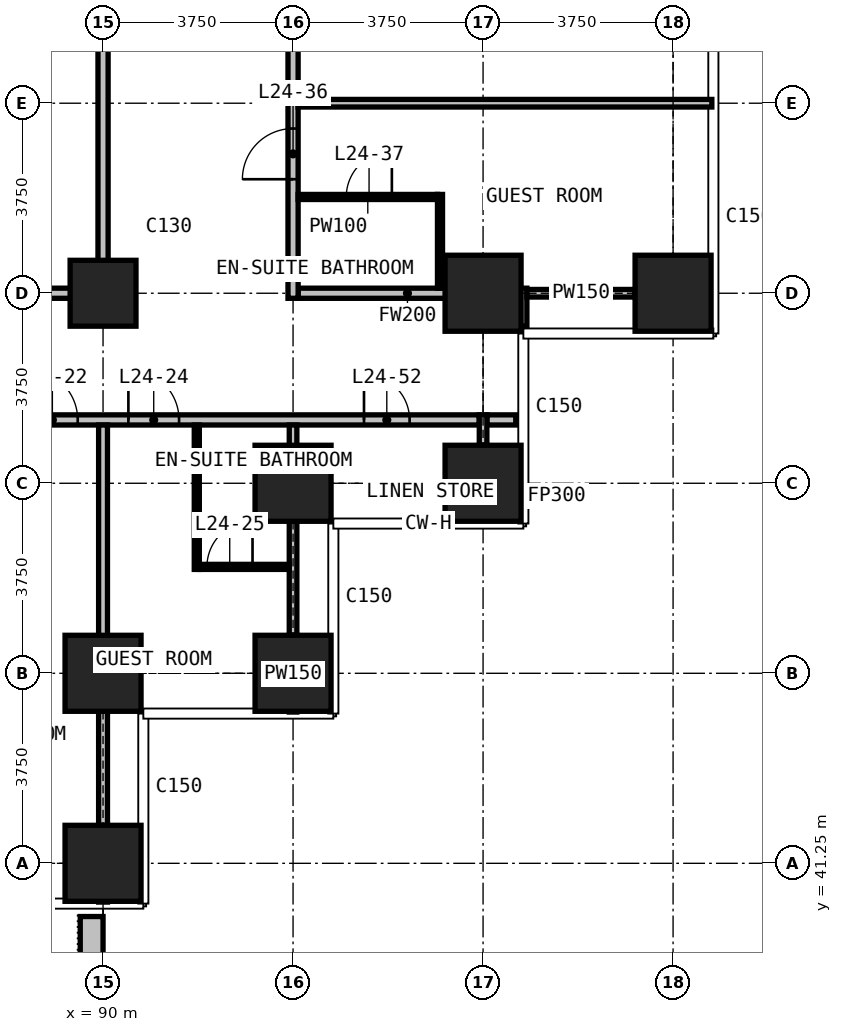
"""IFC4 building model, lengths in metres.
Left out: names, types, materials, properties, quantities, classifications, styles, units other than length and angle.
Written with IfcOpenShell. Run it as: python <this file> out.ifc"""

import sys

from ifc_helpers import new_model, si_unit, direction, frame, frame_2d, origin, origin_2d, place, context, subcontext, project, spatial, rectangle, extrude, element, fill, save


model = new_model("IFC4")
c1 = context("Model", 3, precision=1e-05, world=origin(), true_north=direction((0.0, 1.0)))
c2 = subcontext(c1, "Body", "Model", "MODEL_VIEW")
j1 = project(units=[si_unit("LENGTHUNIT", "METRE"), si_unit("PLANEANGLEUNIT", "RADIAN")], contexts=[c1])
p1 = place(None, origin())
s1 = spatial("IfcSite", under=j1, at=p1, CompositionType="ELEMENT")
p2 = place(p1, origin())
s2 = spatial("IfcBuilding", under=s1, at=p2, CompositionType="ELEMENT")
p3 = place(p2, frame((0.0, 0.0, 98.9)))
s3 = spatial("IfcBuildingStorey", under=s2, at=p3, CompositionType="ELEMENT", Elevation=98.9)
for number, where, z_axis, x_axis in (
    (1, (90.0, 41.25, 0.0), (0.0, 0.0, 1.0), (1.0, 0.0, 0.0)),
    (2, (90.0, 45.0, 0.0), (0.0, 0.0, 1.0), (1.0, 0.0, 0.0)),
):
    element("IfcColumn", number, at=place(p3, frame(where, z_axis=z_axis, x_axis=x_axis)), inside=s3, PredefinedType="COLUMN", context=c2, shape_type="SweptSolid", body=[
        extrude(rectangle(XDim=1.5, YDim=1.5, at=origin_2d()), origin(), (0.0, 0.0, 1.0), 3.3),
    ])
p4 = place(p3, frame((90.0, 52.5, 0.0), z_axis=(0.0, 0.0, 1.0), x_axis=(1.0, 0.0, 0.0)))
e3 = element("IfcColumn", 3, at=p4, inside=s3, PredefinedType="COLUMN", context=c2, shape_type="SweptSolid", body=[
    extrude(rectangle(XDim=1.3, YDim=1.3, at=origin_2d()), origin(), (0.0, 0.0, 1.0), 3.3),
])
for number, where, z_axis, x_axis in (
    (4, (93.75, 45.0, 0.0), (0.0, 0.0, 1.0), (1.0, 0.0, 0.0)),
    (5, (93.75, 48.75, 0.0), (0.0, 0.0, 1.0), (1.0, 0.0, 0.0)),
    (6, (97.5, 48.75, 0.0), (0.0, 0.0, 1.0), (1.0, 0.0, 0.0)),
    (7, (97.5, 52.5, 0.0), (0.0, 0.0, 1.0), (1.0, 0.0, 0.0)),
    (8, (101.25, 52.5, 0.0), (0.0, 0.0, 1.0), (1.0, 0.0, 0.0)),
):
    element("IfcColumn", number, at=place(p3, frame(where, z_axis=z_axis, x_axis=x_axis)), inside=s3, PredefinedType="COLUMN", context=c2, shape_type="SweptSolid", body=[
        extrude(rectangle(XDim=1.5, YDim=1.5, at=origin_2d()), origin(), (0.0, 0.0, 1.0), 3.3),
    ])
p5 = place(p3, frame((89.775, 40.2, 0.0), z_axis=(0.0, 0.0, 1.0), x_axis=(0.0, -1.0, 0.0)))
e9 = element("IfcWall", 9, at=p5, inside=s3, PredefinedType="USERDEFINED", context=c2, shape_type="SweptSolid", body=[
    extrude(rectangle(XDim=2.35, YDim=0.45, at=frame_2d((1.175, 0.0))), origin(), (0.0, 0.0, 1.0), 1.1),
])
p6 = place(p3, frame((52.575, 50.0, 0.0), z_axis=(0.0, 0.0, 1.0), x_axis=(1.0, 0.0, 0.0)))
e10 = element("IfcWall", 10, at=p6, inside=s3, PredefinedType="PARTITIONING", context=c2, shape_type="SweptSolid", body=[
    extrude(rectangle(XDim=44.85, YDim=0.2, at=frame_2d((22.425, 0.0))), origin(), (0.0, 0.0, 1.0), 2.95),
])
p7 = place(p6, frame((5.925, 0.0, 0.0)))
e11 = element("IfcOpeningElement", 11, at=p7, cuts=e10, PredefinedType="OPENING", context=c2, shape_type="SweptSolid", body=[
    extrude(rectangle(XDim=1.0, YDim=2.2, at=frame_2d((0.5, 1.1))), frame((0.0, 0.11, 0.0), z_axis=(0.0, -1.0, 0.0), x_axis=(1.0, 0.0, 0.0)), (0.0, 0.0, 1.0), 0.22),
])
p8 = place(p6, frame((7.925, 0.0, 0.0)))
e12 = element("IfcOpeningElement", 12, at=p8, cuts=e10, PredefinedType="OPENING", context=c2, shape_type="SweptSolid", body=[
    extrude(rectangle(XDim=1.0, YDim=2.2, at=frame_2d((0.5, 1.1))), frame((0.0, 0.11, 0.0), z_axis=(0.0, -1.0, 0.0), x_axis=(1.0, 0.0, 0.0)), (0.0, 0.0, 1.0), 0.22),
])
p9 = place(p6, frame((13.425, 0.0, 0.0)))
e13 = element("IfcOpeningElement", 13, at=p9, cuts=e10, PredefinedType="OPENING", context=c2, shape_type="SweptSolid", body=[
    extrude(rectangle(XDim=1.0, YDim=2.2, at=frame_2d((0.5, 1.1))), frame((0.0, 0.11, 0.0), z_axis=(0.0, -1.0, 0.0), x_axis=(1.0, 0.0, 0.0)), (0.0, 0.0, 1.0), 0.22),
])
p10 = place(p6, frame((15.425, 0.0, 0.0)))
e14 = element("IfcOpeningElement", 14, at=p10, cuts=e10, PredefinedType="OPENING", context=c2, shape_type="SweptSolid", body=[
    extrude(rectangle(XDim=1.0, YDim=2.2, at=frame_2d((0.5, 1.1))), frame((0.0, 0.11, 0.0), z_axis=(0.0, -1.0, 0.0), x_axis=(1.0, 0.0, 0.0)), (0.0, 0.0, 1.0), 0.22),
])
p11 = place(p6, frame((20.925, 0.0, 0.0)))
e15 = element("IfcOpeningElement", 15, at=p11, cuts=e10, PredefinedType="OPENING", context=c2, shape_type="SweptSolid", body=[
    extrude(rectangle(XDim=1.0, YDim=2.2, at=frame_2d((0.5, 1.1))), frame((0.0, 0.11, 0.0), z_axis=(0.0, -1.0, 0.0), x_axis=(1.0, 0.0, 0.0)), (0.0, 0.0, 1.0), 0.22),
])
p12 = place(p6, frame((22.925, 0.0, 0.0)))
e16 = element("IfcOpeningElement", 16, at=p12, cuts=e10, PredefinedType="OPENING", context=c2, shape_type="SweptSolid", body=[
    extrude(rectangle(XDim=1.0, YDim=2.2, at=frame_2d((0.5, 1.1))), frame((0.0, 0.11, 0.0), z_axis=(0.0, -1.0, 0.0), x_axis=(1.0, 0.0, 0.0)), (0.0, 0.0, 1.0), 0.22),
])
p13 = place(p6, frame((28.425, 0.0, 0.0)))
e17 = element("IfcOpeningElement", 17, at=p13, cuts=e10, PredefinedType="OPENING", context=c2, shape_type="SweptSolid", body=[
    extrude(rectangle(XDim=1.0, YDim=2.2, at=frame_2d((0.5, 1.1))), frame((0.0, 0.11, 0.0), z_axis=(0.0, -1.0, 0.0), x_axis=(1.0, 0.0, 0.0)), (0.0, 0.0, 1.0), 0.22),
])
p14 = place(p6, frame((30.425, 0.0, 0.0)))
e18 = element("IfcOpeningElement", 18, at=p14, cuts=e10, PredefinedType="OPENING", context=c2, shape_type="SweptSolid", body=[
    extrude(rectangle(XDim=1.0, YDim=2.2, at=frame_2d((0.5, 1.1))), frame((0.0, 0.11, 0.0), z_axis=(0.0, -1.0, 0.0), x_axis=(1.0, 0.0, 0.0)), (0.0, 0.0, 1.0), 0.22),
])
p15 = place(p6, frame((35.925, 0.0, 0.0)))
e19 = element("IfcOpeningElement", 19, at=p15, cuts=e10, PredefinedType="OPENING", context=c2, shape_type="SweptSolid", body=[
    extrude(rectangle(XDim=1.0, YDim=2.2, at=frame_2d((0.5, 1.1))), frame((0.0, 0.11, 0.0), z_axis=(0.0, -1.0, 0.0), x_axis=(1.0, 0.0, 0.0)), (0.0, 0.0, 1.0), 0.22),
])
p16 = place(p6, frame((37.925, 0.0, 0.0)))
e20 = element("IfcOpeningElement", 20, at=p16, cuts=e10, PredefinedType="OPENING", context=c2, shape_type="SweptSolid", body=[
    extrude(rectangle(XDim=1.0, YDim=2.2, at=frame_2d((0.5, 1.1))), frame((0.0, 0.11, 0.0), z_axis=(0.0, -1.0, 0.0), x_axis=(1.0, 0.0, 0.0)), (0.0, 0.0, 1.0), 0.22),
])
p17 = place(p6, frame((1.4, 0.0, 0.0)))
e21 = element("IfcOpeningElement", 21, at=p17, cuts=e10, PredefinedType="OPENING", context=c2, shape_type="SweptSolid", body=[
    extrude(rectangle(XDim=0.9, YDim=2.2, at=frame_2d((0.45, 1.1))), frame((0.0, 0.11, 0.0), z_axis=(0.0, -1.0, 0.0), x_axis=(1.0, 0.0, 0.0)), (0.0, 0.0, 1.0), 0.22),
])
p18 = place(p6, frame((42.575, 0.0, 0.0)))
e22 = element("IfcOpeningElement", 22, at=p18, cuts=e10, PredefinedType="OPENING", context=c2, shape_type="SweptSolid", body=[
    extrude(rectangle(XDim=0.9, YDim=2.2, at=frame_2d((0.45, 1.1))), frame((0.0, 0.11, 0.0), z_axis=(0.0, -1.0, 0.0), x_axis=(1.0, 0.0, 0.0)), (0.0, 0.0, 1.0), 0.22),
])
p19 = place(p3, frame((97.575, 50.0, 0.0), z_axis=(0.0, 0.0, 1.0), x_axis=(1.0, 0.0, 0.0)))
e23 = element("IfcWall", 23, at=p19, inside=s3, PredefinedType="PARTITIONING", context=c2, shape_type="SweptSolid", body=[
    extrude(rectangle(XDim=0.57, YDim=0.2, at=frame_2d((0.285, 0.0))), origin(), (0.0, 0.0, 1.0), 2.95),
])
p20 = place(p3, frame((60.1, 52.5, 0.0), z_axis=(0.0, 0.0, 1.0), x_axis=(1.0, 0.0, 0.0)))
e24 = element("IfcWall", 24, at=p20, inside=s3, PredefinedType="PARTITIONING", context=c2, shape_type="SweptSolid", body=[
    extrude(rectangle(XDim=29.8, YDim=0.2, at=frame_2d((14.9, 0.0))), origin(), (0.0, 0.0, 1.0), 2.95),
])
p21 = place(p20, frame((8.4, 0.0, 0.0)))
e25 = element("IfcOpeningElement", 25, at=p21, cuts=e24, PredefinedType="OPENING", context=c2, shape_type="SweptSolid", body=[
    extrude(rectangle(XDim=1.8, YDim=2.2, at=frame_2d((0.9, 1.1))), frame((0.0, 0.11, 0.0), z_axis=(0.0, -1.0, 0.0), x_axis=(1.0, 0.0, 0.0)), (0.0, 0.0, 1.0), 0.22),
])
p22 = place(p20, frame((23.75, 0.0, 0.0)))
e26 = element("IfcOpeningElement", 26, at=p22, cuts=e24, PredefinedType="OPENING", context=c2, shape_type="SweptSolid", body=[
    extrude(rectangle(XDim=0.9, YDim=2.2, at=frame_2d((0.45, 1.1))), frame((0.0, 0.11, 0.0), z_axis=(0.0, -1.0, 0.0), x_axis=(1.0, 0.0, 0.0)), (0.0, 0.0, 1.0), 0.22),
])
p23 = place(p3, frame((93.85, 52.5, 0.0), z_axis=(0.0, 0.0, 1.0), x_axis=(1.0, 0.0, 0.0)))
e27 = element("IfcWall", 27, at=p23, inside=s3, PredefinedType="PARTITIONING", context=c2, shape_type="SweptSolid", body=[
    extrude(rectangle(XDim=4.315, YDim=0.2, at=frame_2d((2.157, 0.0))), origin(), (0.0, 0.0, 1.0), 2.95),
])
p24 = place(p3, frame((90.0, 52.4, 0.0), z_axis=(0.0, 0.0, 1.0), x_axis=(0.0, 1.0, 0.0)))
e28 = element("IfcWall", 28, at=p24, inside=s3, PredefinedType="PARTITIONING", context=c2, shape_type="SweptSolid", body=[
    extrude(rectangle(XDim=18.84, YDim=0.2, at=frame_2d((9.42, 0.0))), origin(), (0.0, 0.0, 1.0), 2.95),
])
p25 = place(p24, frame((10.85, 0.0, 0.0)))
e29 = element("IfcOpeningElement", 29, at=p25, cuts=e28, PredefinedType="OPENING", context=c2, shape_type="SweptSolid", body=[
    extrude(rectangle(XDim=1.0, YDim=2.2, at=frame_2d((0.5, 1.1))), frame((0.0, 0.11, 0.0), z_axis=(0.0, -1.0, 0.0), x_axis=(1.0, 0.0, 0.0)), (0.0, 0.0, 1.0), 0.22),
])
p26 = place(p24, frame((16.5, 0.0, 0.0)))
e30 = element("IfcOpeningElement", 30, at=p26, cuts=e28, PredefinedType="OPENING", context=c2, shape_type="SweptSolid", body=[
    extrude(rectangle(XDim=0.9, YDim=2.2, at=frame_2d((0.45, 1.1))), frame((0.0, 0.11, 0.0), z_axis=(0.0, -1.0, 0.0), x_axis=(1.0, 0.0, 0.0)), (0.0, 0.0, 1.0), 0.22),
])
p27 = place(p3, frame((93.75, 52.4, 0.0), z_axis=(0.0, 0.0, 1.0), x_axis=(0.0, 1.0, 0.0)))
e31 = element("IfcWall", 31, at=p27, inside=s3, PredefinedType="PARTITIONING", context=c2, shape_type="SweptSolid", body=[
    extrude(rectangle(XDim=34.6, YDim=0.2, at=frame_2d((17.3, 0.0))), origin(), (0.0, 0.0, 1.0), 2.95),
])
p28 = place(p27, frame((2.35, 0.0, 0.0)))
e32 = element("IfcOpeningElement", 32, at=p28, cuts=e31, PredefinedType="OPENING", context=c2, shape_type="SweptSolid", body=[
    extrude(rectangle(XDim=1.0, YDim=2.1, at=frame_2d((0.5, 1.05))), frame((0.0, 0.11, 0.0), z_axis=(0.0, -1.0, 0.0), x_axis=(1.0, 0.0, 0.0)), (0.0, 0.0, 1.0), 0.22),
])
p29 = place(p27, frame((4.95, 0.0, 0.0)))
e33 = element("IfcOpeningElement", 33, at=p29, cuts=e31, PredefinedType="OPENING", context=c2, shape_type="SweptSolid", body=[
    extrude(rectangle(XDim=1.0, YDim=2.2, at=frame_2d((0.5, 1.1))), frame((0.0, 0.11, 0.0), z_axis=(0.0, -1.0, 0.0), x_axis=(1.0, 0.0, 0.0)), (0.0, 0.0, 1.0), 0.22),
])
p30 = place(p27, frame((16.75, 0.0, 0.0)))
e34 = element("IfcOpeningElement", 34, at=p30, cuts=e31, PredefinedType="OPENING", context=c2, shape_type="SweptSolid", body=[
    extrude(rectangle(XDim=1.0, YDim=2.2, at=frame_2d((0.5, 1.1))), frame((0.0, 0.11, 0.0), z_axis=(0.0, -1.0, 0.0), x_axis=(1.0, 0.0, 0.0)), (0.0, 0.0, 1.0), 0.22),
])
p31 = place(p27, frame((19.95, 0.0, 0.0)))
e35 = element("IfcOpeningElement", 35, at=p31, cuts=e31, PredefinedType="OPENING", context=c2, shape_type="SweptSolid", body=[
    extrude(rectangle(XDim=1.0, YDim=2.2, at=frame_2d((0.5, 1.1))), frame((0.0, 0.11, 0.0), z_axis=(0.0, -1.0, 0.0), x_axis=(1.0, 0.0, 0.0)), (0.0, 0.0, 1.0), 0.22),
])
p32 = place(p27, frame((31.75, 0.0, 0.0)))
e36 = element("IfcOpeningElement", 36, at=p32, cuts=e31, PredefinedType="OPENING", context=c2, shape_type="SweptSolid", body=[
    extrude(rectangle(XDim=1.0, YDim=2.2, at=frame_2d((0.5, 1.1))), frame((0.0, 0.11, 0.0), z_axis=(0.0, -1.0, 0.0), x_axis=(1.0, 0.0, 0.0)), (0.0, 0.0, 1.0), 0.22),
])
p33 = place(p3, frame((98.265, 51.855, 0.0), z_axis=(0.0, 0.0, 1.0), x_axis=(0.0, 1.0, 0.0)))
e37 = element("IfcWall", 37, at=p33, inside=s3, PredefinedType="PARTITIONING", context=c2, shape_type="SweptSolid", body=[
    extrude(rectangle(XDim=0.745, YDim=0.2, at=frame_2d((0.373, 0.0))), origin(), (0.0, 0.0, 1.0), 2.95),
])
p34 = place(p3, frame((90.0, 40.485, 0.0), z_axis=(0.0, 0.0, 1.0), x_axis=(0.0, 1.0, 0.0)))
e38 = element("IfcWall", 38, at=p34, inside=s3, PredefinedType="PARTITIONING", context=c2, shape_type="SweptSolid", body=[
    extrude(rectangle(XDim=1.515, YDim=0.175, at=frame_2d((0.757, 0.0))), origin(), (0.0, 0.0, 1.0), 2.95),
])
p35 = place(p3, frame((90.0, 42.0, 0.0), z_axis=(0.0, 0.0, 1.0), x_axis=(0.0, 1.0, 0.0)))
e39 = element("IfcWall", 39, at=p35, inside=s3, PredefinedType="PARTITIONING", context=c2, shape_type="SweptSolid", body=[
    extrude(rectangle(XDim=2.251, YDim=0.175, at=frame_2d((1.125, 0.0))), origin(), (0.0, 0.0, 1.0), 2.15),
])
p36 = place(p3, frame((90.0, 44.251, 0.0), z_axis=(0.0, 0.0, 1.0), x_axis=(0.0, 1.0, 0.0)))
e40 = element("IfcWall", 40, at=p36, inside=s3, PredefinedType="PARTITIONING", context=c2, shape_type="SweptSolid", body=[
    extrude(rectangle(XDim=5.649, YDim=0.175, at=frame_2d((2.824, 0.0))), origin(), (0.0, 0.0, 1.0), 2.95),
])
p37 = place(p3, frame((98.365, 52.5, 0.0), z_axis=(0.0, 0.0, 1.0), x_axis=(1.0, 0.0, 0.0)))
e41 = element("IfcWall", 41, at=p37, inside=s3, PredefinedType="PARTITIONING", context=c2, shape_type="SweptSolid", body=[
    extrude(rectangle(XDim=2.136, YDim=0.15, at=frame_2d((1.068, 0.0))), origin(), (0.0, 0.0, 1.0), 2.15),
])
p38 = place(p3, frame((100.501, 52.5, 0.0), z_axis=(0.0, 0.0, 1.0), x_axis=(1.0, 0.0, 0.0)))
e42 = element("IfcWall", 42, at=p38, inside=s3, PredefinedType="PARTITIONING", context=c2, shape_type="SweptSolid", body=[
    extrude(rectangle(XDim=1.394, YDim=0.15, at=frame_2d((0.697, 0.0))), origin(), (0.0, 0.0, 1.0), 2.95),
])
p39 = place(p3, frame((93.85, 56.25, 0.0), z_axis=(0.0, 0.0, 1.0), x_axis=(1.0, 0.0, 0.0)))
e43 = element("IfcWall", 43, at=p39, inside=s3, PredefinedType="PARTITIONING", context=c2, shape_type="SweptSolid", body=[
    extrude(rectangle(XDim=8.165, YDim=0.15, at=frame_2d((4.083, 0.0))), origin(), (0.0, 0.0, 1.0), 2.95),
])
p40 = place(p3, frame((93.75, 44.235, 0.0), z_axis=(0.0, 0.0, 1.0), x_axis=(0.0, 1.0, 0.0)))
e44 = element("IfcWall", 44, at=p40, inside=s3, PredefinedType="PARTITIONING", context=c2, shape_type="SweptSolid", body=[
    extrude(rectangle(XDim=1.515, YDim=0.15, at=frame_2d((0.757, 0.0))), origin(), (0.0, 0.0, 1.0), 2.95),
])
p41 = place(p3, frame((93.75, 45.75, 0.0), z_axis=(0.0, 0.0, 1.0), x_axis=(0.0, 1.0, 0.0)))
e45 = element("IfcWall", 45, at=p41, inside=s3, PredefinedType="PARTITIONING", context=c2, shape_type="SweptSolid", body=[
    extrude(rectangle(XDim=2.251, YDim=0.15, at=frame_2d((1.125, 0.0))), origin(), (0.0, 0.0, 1.0), 2.15),
])
p42 = place(p3, frame((93.75, 48.001, 0.0), z_axis=(0.0, 0.0, 1.0), x_axis=(0.0, 1.0, 0.0)))
e46 = element("IfcWall", 46, at=p42, inside=s3, PredefinedType="PARTITIONING", context=c2, shape_type="SweptSolid", body=[
    extrude(rectangle(XDim=1.899, YDim=0.15, at=frame_2d((0.949, 0.0))), origin(), (0.0, 0.0, 1.0), 2.95),
])
p43 = place(p3, frame((97.5, 48.105, 0.0), z_axis=(0.0, 0.0, 1.0), x_axis=(0.0, 1.0, 0.0)))
e47 = element("IfcWall", 47, at=p43, inside=s3, PredefinedType="PARTITIONING", context=c2, shape_type="SweptSolid", body=[
    extrude(rectangle(XDim=1.395, YDim=0.15, at=frame_2d((0.698, 0.0))), origin(), (0.0, 0.0, 1.0), 2.95),
])
p44 = place(p3, frame((97.5, 49.5, 0.0), z_axis=(0.0, 0.0, 1.0), x_axis=(0.0, 1.0, 0.0)))
e48 = element("IfcWall", 48, at=p44, inside=s3, PredefinedType="PARTITIONING", context=c2, shape_type="SweptSolid", body=[
    extrude(rectangle(XDim=0.6, YDim=0.15, at=frame_2d((0.3, 0.0))), origin(), (0.0, 0.0, 1.0), 2.15),
])
p45 = place(p3, frame((91.9, 47.1, 0.0), z_axis=(0.0, 0.0, 1.0), x_axis=(1.0, 0.0, 0.0)))
e49 = element("IfcWall", 49, at=p45, inside=s3, PredefinedType="PARTITIONING", context=c2, shape_type="SweptSolid", body=[
    extrude(rectangle(XDim=1.775, YDim=0.1, at=frame_2d((0.888, 0.0))), origin(), (0.0, 0.0, 1.0), 2.95),
])
p46 = place(p45, frame((0.15, 0.0, 0.0)))
e50 = element("IfcOpeningElement", 50, at=p46, cuts=e49, PredefinedType="OPENING", context=c2, shape_type="SweptSolid", body=[
    extrude(rectangle(XDim=0.9, YDim=2.2, at=frame_2d((0.45, 1.1))), frame((0.0, 0.06, 0.0), z_axis=(0.0, -1.0, 0.0), x_axis=(1.0, 0.0, 0.0)), (0.0, 0.0, 1.0), 0.12),
])
p47 = place(p3, frame((93.85, 54.4, 0.0), z_axis=(0.0, 0.0, 1.0), x_axis=(1.0, 0.0, 0.0)))
e51 = element("IfcWall", 51, at=p47, inside=s3, PredefinedType="PARTITIONING", context=c2, shape_type="SweptSolid", body=[
    extrude(rectangle(XDim=2.75, YDim=0.1, at=frame_2d((1.375, 0.0))), origin(), (0.0, 0.0, 1.0), 2.95),
])
p48 = place(p47, frame((0.95, 0.0, 0.0)))
e52 = element("IfcOpeningElement", 52, at=p48, cuts=e51, PredefinedType="OPENING", context=c2, shape_type="SweptSolid", body=[
    extrude(rectangle(XDim=0.9, YDim=2.2, at=frame_2d((0.45, 1.1))), frame((0.0, 0.06, 0.0), z_axis=(0.0, -1.0, 0.0), x_axis=(1.0, 0.0, 0.0)), (0.0, 0.0, 1.0), 0.12),
])
p49 = place(p3, frame((91.85, 47.05, 0.0), z_axis=(0.0, 0.0, 1.0), x_axis=(0.0, 1.0, 0.0)))
e53 = element("IfcWall", 53, at=p49, inside=s3, PredefinedType="PARTITIONING", context=c2, shape_type="SweptSolid", body=[
    extrude(rectangle(XDim=2.85, YDim=0.1, at=frame_2d((1.425, 0.0))), origin(), (0.0, 0.0, 1.0), 2.95),
])
p50 = place(p3, frame((96.65, 52.6, 0.0), z_axis=(0.0, 0.0, 1.0), x_axis=(0.0, 1.0, 0.0)))
e54 = element("IfcWall", 54, at=p50, inside=s3, PredefinedType="PARTITIONING", context=c2, shape_type="SweptSolid", body=[
    extrude(rectangle(XDim=1.85, YDim=0.1, at=frame_2d((0.925, 0.0))), origin(), (0.0, 0.0, 1.0), 2.95),
])
p51 = place(p15, origin())
e55 = element("IfcDoor", 55, at=p51, inside=s3, OperationType="SINGLE_SWING_LEFT", PredefinedType="DOOR", context=c2, shape_type="SweptSolid", body=[
    extrude(rectangle(XDim=1.0, YDim=2.2, at=frame_2d((0.5, 1.1))), frame((0.0, 0.025, 0.0), z_axis=(0.0, -1.0, 0.0), x_axis=(1.0, 0.0, 0.0)), (0.0, 0.0, 1.0), 0.05),
])
fill(e19, e55)
p52 = place(p16, origin())
e56 = element("IfcDoor", 56, at=p52, inside=s3, OperationType="SINGLE_SWING_LEFT", PredefinedType="DOOR", context=c2, shape_type="SweptSolid", body=[
    extrude(rectangle(XDim=1.0, YDim=2.2, at=frame_2d((0.5, 1.1))), frame((0.0, 0.025, 0.0), z_axis=(0.0, -1.0, 0.0), x_axis=(1.0, 0.0, 0.0)), (0.0, 0.0, 1.0), 0.05),
])
fill(e20, e56)
p53 = place(p46, origin())
e57 = element("IfcDoor", 57, at=p53, inside=s3, OperationType="SINGLE_SWING_RIGHT", PredefinedType="DOOR", context=c2, shape_type="SweptSolid", body=[
    extrude(rectangle(XDim=0.9, YDim=2.2, at=frame_2d((0.45, 1.1))), frame((0.0, 0.025, 0.0), z_axis=(0.0, -1.0, 0.0), x_axis=(1.0, 0.0, 0.0)), (0.0, 0.0, 1.0), 0.05),
])
fill(e50, e57)
p54 = place(p28, origin())
e58 = element("IfcDoor", 58, at=p54, inside=s3, OperationType="SINGLE_SWING_LEFT", PredefinedType="DOOR", context=c2, shape_type="SweptSolid", body=[
    extrude(rectangle(XDim=1.0, YDim=2.1, at=frame_2d((0.5, 1.05))), frame((0.0, 0.025, 0.0), z_axis=(0.0, -1.0, 0.0), x_axis=(1.0, 0.0, 0.0)), (0.0, 0.0, 1.0), 0.05),
])
fill(e32, e58)
p55 = place(p48, origin())
e59 = element("IfcDoor", 59, at=p55, inside=s3, OperationType="SINGLE_SWING_RIGHT", PredefinedType="DOOR", context=c2, shape_type="SweptSolid", body=[
    extrude(rectangle(XDim=0.9, YDim=2.2, at=frame_2d((0.45, 1.1))), frame((0.0, 0.025, 0.0), z_axis=(0.0, -1.0, 0.0), x_axis=(1.0, 0.0, 0.0)), (0.0, 0.0, 1.0), 0.05),
])
fill(e52, e59)
p56 = place(p18, origin())
e60 = element("IfcDoor", 60, at=p56, inside=s3, OperationType="SINGLE_SWING_LEFT", PredefinedType="DOOR", context=c2, shape_type="SweptSolid", body=[
    extrude(rectangle(XDim=0.9, YDim=2.2, at=frame_2d((0.45, 1.1))), frame((0.0, 0.025, 0.0), z_axis=(0.0, -1.0, 0.0), x_axis=(1.0, 0.0, 0.0)), (0.0, 0.0, 1.0), 0.05),
])
fill(e22, e60)
save(model, sys.argv[1])
